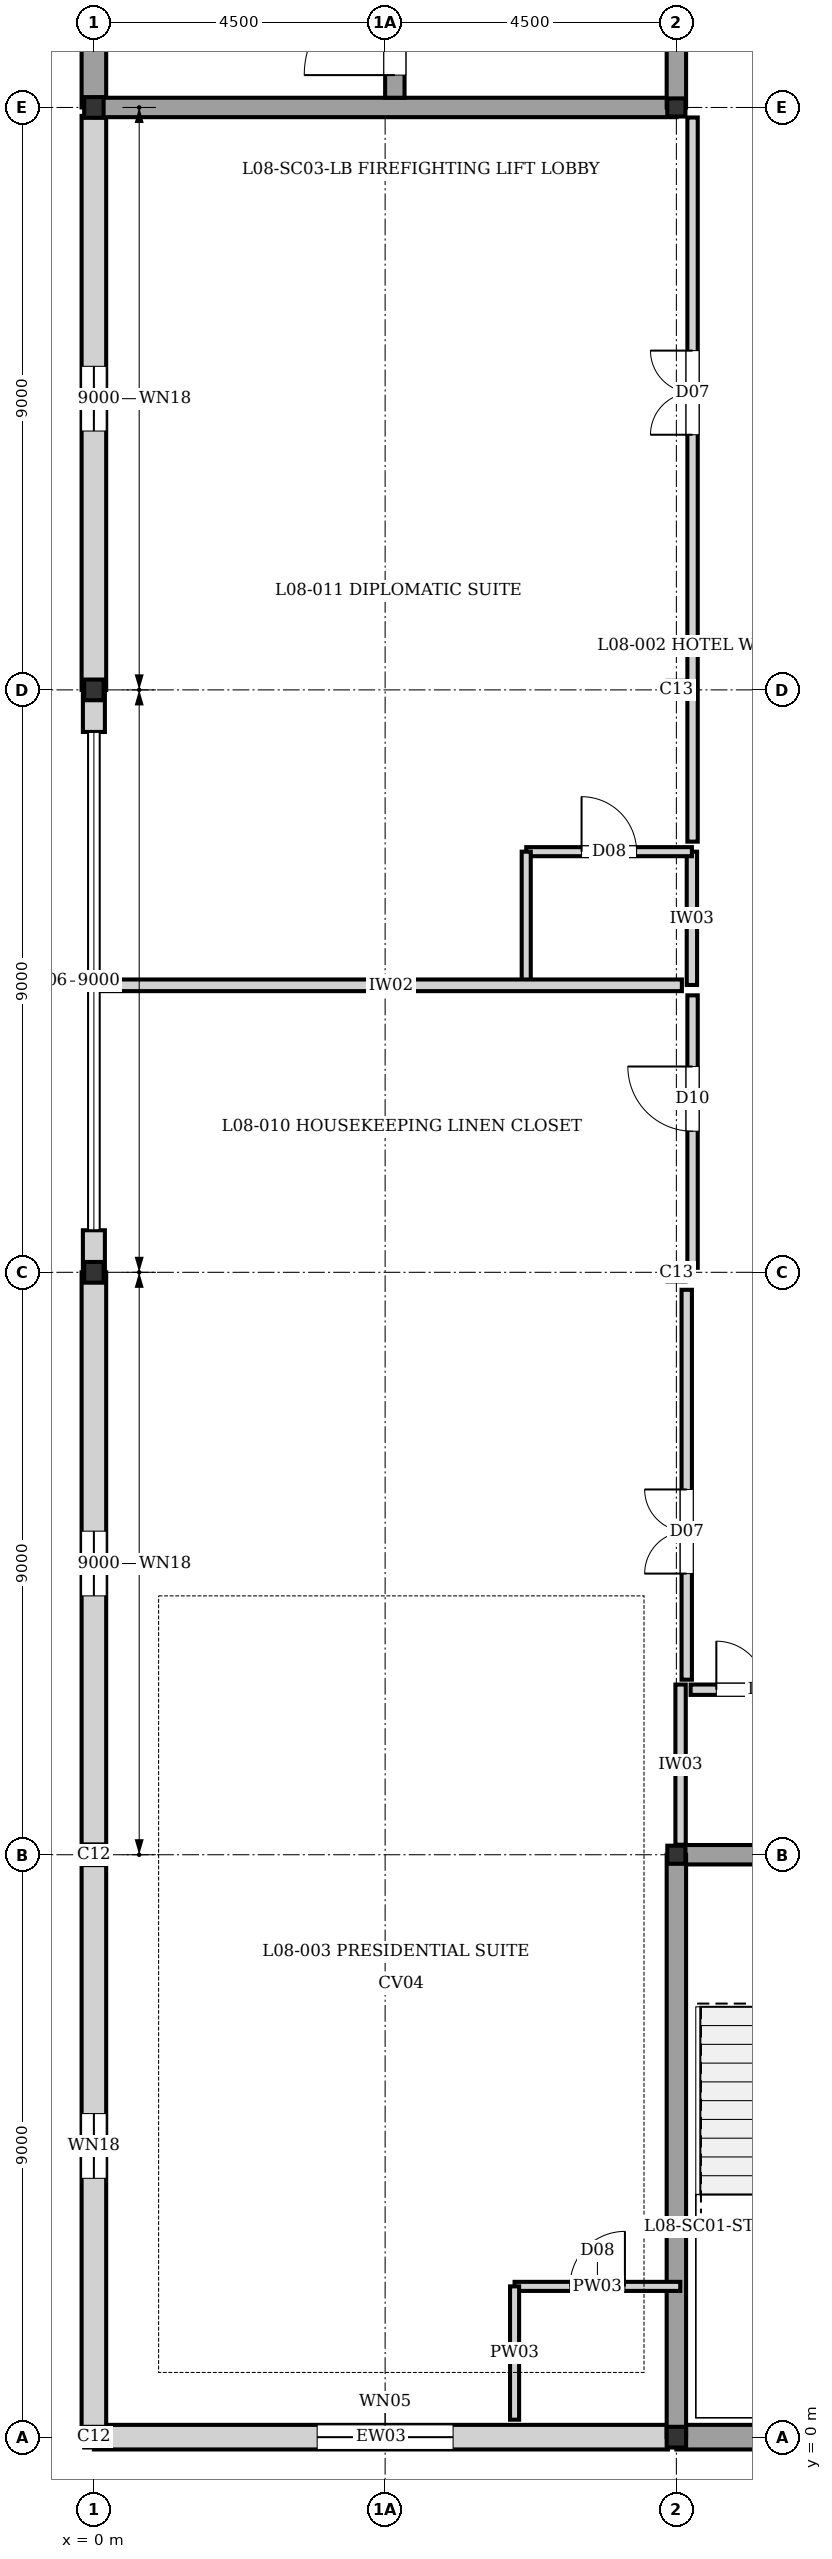
"""IFC4 building model, lengths in metres.
Left out: names, types, materials, properties, quantities, classifications, styles, units other than length and angle.
Written with IfcOpenShell. Run it as: python <this file> out.ifc"""

import sys

from ifc_helpers import new_model, si_unit, direction, frame, frame_2d, origin, origin_2d, place, context, subcontext, project, spatial, rectangle, i_section, extrude, element, fill, save


model = new_model("IFC4")
c1 = context("Model", 3, precision=1e-05, world=origin(), true_north=direction((0.0, 1.0)))
c2 = subcontext(c1, "Body", "Model", "MODEL_VIEW")
j1 = project(units=[si_unit("LENGTHUNIT", "METRE"), si_unit("PLANEANGLEUNIT", "RADIAN")], contexts=[c1])
p1 = place(None, origin())
s1 = spatial("IfcSite", under=j1, at=p1, CompositionType="ELEMENT")
p2 = place(p1, origin())
s2 = spatial("IfcBuilding", under=s1, at=p2, CompositionType="ELEMENT")
p3 = place(p2, frame((0.0, 0.0, 26.88)))
s3 = spatial("IfcBuildingStorey", under=s2, at=p3, CompositionType="ELEMENT", Elevation=26.88)
for number, where, z_axis, x_axis in (
    (1, (0.0, 0.0, 0.0), (0.0, 0.0, 1.0), (1.0, 0.0, 0.0)),
    (2, (0.0, 9.0, 0.0), (0.0, 0.0, 1.0), (1.0, 0.0, 0.0)),
    (3, (0.0, 18.0, 0.0), (0.0, 0.0, 1.0), (1.0, 0.0, 0.0)),
    (4, (0.0, 27.0, 0.0), (0.0, 0.0, 1.0), (1.0, 0.0, 0.0)),
    (5, (0.0, 36.0, 0.0), (0.0, 0.0, 1.0), (1.0, 0.0, 0.0)),
    (6, (9.0, 0.0, 0.0), (0.0, 0.0, 1.0), (1.0, 0.0, 0.0)),
):
    element("IfcColumn", number, at=place(p3, frame(where, z_axis=z_axis, x_axis=x_axis)), inside=s3, PredefinedType="COLUMN", context=c2, shape_type="SweptSolid", body=[
        extrude(i_section(OverallWidth=0.3, OverallDepth=0.32, WebThickness=0.011, FlangeThickness=0.021, at=origin_2d()), origin(), (0.0, 0.0, 1.0), 3.52),
    ])
for number, where, z_axis, x_axis in (
    (7, (9.0, 9.0, 0.0), (0.0, 0.0, 1.0), (1.0, 0.0, 0.0)),
    (8, (9.0, 18.0, 0.0), (0.0, 0.0, 1.0), (1.0, 0.0, 0.0)),
    (9, (9.0, 27.0, 0.0), (0.0, 0.0, 1.0), (1.0, 0.0, 0.0)),
    (10, (9.0, 36.0, 0.0), (0.0, 0.0, 1.0), (1.0, 0.0, 0.0)),
):
    element("IfcColumn", number, at=place(p3, frame(where, z_axis=z_axis, x_axis=x_axis)), inside=s3, PredefinedType="COLUMN", context=c2, shape_type="SweptSolid", body=[
        extrude(i_section(OverallWidth=0.28, OverallDepth=0.28, WebThickness=0.01, FlangeThickness=0.018, at=origin_2d()), origin(), (0.0, 0.0, 1.0), 3.52),
    ])
p4 = place(p3, frame((18.0, 0.0, 0.0), z_axis=(0.0, 0.0, 1.0), x_axis=(-1.0, 0.0, 0.0)))
e11 = element("IfcWall", 11, at=p4, inside=s3, PredefinedType="SOLIDWALL", context=c2, shape_type="SweptSolid", body=[
    extrude(rectangle(XDim=9.0, YDim=0.38, at=frame_2d((4.5, 0.0))), origin(), (0.0, 0.0, 1.0), 3.27),
])
p5 = place(p3, frame((8.87, 0.0, 0.0), z_axis=(0.0, 0.0, 1.0), x_axis=(-1.0, 0.0, 0.0)))
e12 = element("IfcWall", 12, at=p5, inside=s3, PredefinedType="SOLIDWALL", context=c2, shape_type="SweptSolid", body=[
    extrude(rectangle(XDim=8.87, YDim=0.38, at=frame_2d((4.435, 0.0))), origin(), (0.0, 0.0, 1.0), 3.27),
])
p6 = place(p5, frame((3.32, 0.0, 0.4)))
e13 = element("IfcOpeningElement", 13, at=p6, cuts=e12, PredefinedType="OPENING", context=c2, shape_type="SweptSolid", body=[
    extrude(rectangle(XDim=2.1, YDim=1.95, at=frame_2d((1.05, 0.975))), frame((0.0, 0.2, 0.0), z_axis=(0.0, -1.0, 0.0), x_axis=(1.0, 0.0, 0.0)), (0.0, 0.0, 1.0), 0.4),
])
p7 = place(p3, frame((0.0, 0.155, 0.0), z_axis=(0.0, 0.0, 1.0), x_axis=(0.0, 1.0, 0.0)))
e14 = element("IfcWall", 14, at=p7, inside=s3, PredefinedType="SOLIDWALL", context=c2, shape_type="SweptSolid", body=[
    extrude(rectangle(XDim=8.845, YDim=0.38, at=frame_2d((4.422, 0.0))), origin(), (0.0, 0.0, 1.0), 2.87),
])
p8 = place(p7, frame((3.845, 0.0, 0.4)))
e15 = element("IfcOpeningElement", 15, at=p8, cuts=e14, PredefinedType="OPENING", context=c2, shape_type="SweptSolid", body=[
    extrude(rectangle(XDim=1.0, YDim=1.6, at=frame_2d((0.5, 0.8))), frame((0.0, 0.2, 0.0), z_axis=(0.0, -1.0, 0.0), x_axis=(1.0, 0.0, 0.0)), (0.0, 0.0, 1.0), 0.4),
])
p9 = place(p3, frame((0.0, 9.0, 0.0), z_axis=(0.0, 0.0, 1.0), x_axis=(0.0, 1.0, 0.0)))
e16 = element("IfcWall", 16, at=p9, inside=s3, PredefinedType="SOLIDWALL", context=c2, shape_type="SweptSolid", body=[
    extrude(rectangle(XDim=9.0, YDim=0.38, at=frame_2d((4.5, 0.0))), origin(), (0.0, 0.0, 1.0), 3.27),
])
p10 = place(p9, frame((4.0, 0.0, 0.4)))
e17 = element("IfcOpeningElement", 17, at=p10, cuts=e16, PredefinedType="OPENING", context=c2, shape_type="SweptSolid", body=[
    extrude(rectangle(XDim=1.0, YDim=1.6, at=frame_2d((0.5, 0.8))), frame((0.0, 0.2, 0.0), z_axis=(0.0, -1.0, 0.0), x_axis=(1.0, 0.0, 0.0)), (0.0, 0.0, 1.0), 0.4),
])
for number, where, z_axis, x_axis in (
    (18, (0.0, 18.0, 0.0), (0.0, 0.0, 1.0), (0.0, 1.0, 0.0)),
    (19, (0.0, 26.35, 0.0), (0.0, 0.0, 1.0), (0.0, 1.0, 0.0)),
):
    element("IfcWall", number, at=place(p3, frame(where, z_axis=z_axis, x_axis=x_axis)), inside=s3, PredefinedType="SOLIDWALL", context=c2, shape_type="SweptSolid", body=[
        extrude(rectangle(XDim=0.65, YDim=0.34, at=frame_2d((0.325, 0.0))), origin(), (0.0, 0.0, 1.0), 2.97),
    ])
p11 = place(p3, frame((0.0, 27.0, 0.0), z_axis=(0.0, 0.0, 1.0), x_axis=(0.0, 1.0, 0.0)))
e20 = element("IfcWall", 20, at=p11, inside=s3, PredefinedType="SOLIDWALL", context=c2, shape_type="SweptSolid", body=[
    extrude(rectangle(XDim=8.87, YDim=0.38, at=frame_2d((4.435, 0.0))), origin(), (0.0, 0.0, 1.0), 3.27),
])
p12 = place(p11, frame((4.0, 0.0, 0.4)))
e21 = element("IfcOpeningElement", 21, at=p12, cuts=e20, PredefinedType="OPENING", context=c2, shape_type="SweptSolid", body=[
    extrude(rectangle(XDim=1.0, YDim=1.6, at=frame_2d((0.5, 0.8))), frame((0.0, 0.2, 0.0), z_axis=(0.0, -1.0, 0.0), x_axis=(1.0, 0.0, 0.0)), (0.0, 0.0, 1.0), 0.4),
])
p13 = place(p3, frame((0.0, 36.0, 0.0), z_axis=(0.0, 0.0, 1.0), x_axis=(0.0, 1.0, 0.0)))
e22 = element("IfcWall", 22, at=p13, inside=s3, PredefinedType="SOLIDWALL", context=c2, shape_type="SweptSolid", body=[
    extrude(rectangle(XDim=9.0, YDim=0.38, at=frame_2d((4.5, 0.0))), origin(), (0.0, 0.0, 1.0), 3.27),
])
p14 = place(p3, frame((9.0, 9.0, 0.0), z_axis=(0.0, 0.0, 1.0), x_axis=(1.0, 0.0, 0.0)))
e23 = element("IfcWall", 23, at=p14, inside=s3, PredefinedType="SHEAR", context=c2, shape_type="SweptSolid", body=[
    extrude(rectangle(XDim=9.0, YDim=0.3, at=frame_2d((4.5, 0.0))), origin(), (0.0, 0.0, 1.0), 3.27),
])
p15 = place(p14, frame((5.95, 0.0, 0.0)))
e24 = element("IfcOpeningElement", 24, at=p15, cuts=e23, PredefinedType="OPENING", context=c2, shape_type="SweptSolid", body=[
    extrude(rectangle(XDim=1.6, YDim=2.1, at=frame_2d((0.8, 1.05))), frame((0.0, 0.16, 0.0), z_axis=(0.0, -1.0, 0.0), x_axis=(1.0, 0.0, 0.0)), (0.0, 0.0, 1.0), 0.32),
])
for number, where, z_axis, x_axis in (
    (25, (9.0, 0.0, 0.0), (0.0, 0.0, 1.0), (0.0, 1.0, 0.0)),
    (26, (0.0, 36.0, 0.0), (0.0, 0.0, 1.0), (1.0, 0.0, 0.0)),
):
    element("IfcWall", number, at=place(p3, frame(where, z_axis=z_axis, x_axis=x_axis)), inside=s3, PredefinedType="SHEAR", context=c2, shape_type="SweptSolid", body=[
        extrude(rectangle(XDim=9.0, YDim=0.3, at=frame_2d((4.5, 0.0))), origin(), (0.0, 0.0, 1.0), 3.27),
    ])
p16 = place(p3, frame((9.0, 36.0, 0.0), z_axis=(0.0, 0.0, 1.0), x_axis=(0.0, 1.0, 0.0)))
e27 = element("IfcWall", 27, at=p16, inside=s3, PredefinedType="SHEAR", context=c2, shape_type="SweptSolid", body=[
    extrude(rectangle(XDim=9.0, YDim=0.3, at=frame_2d((4.5, 0.0))), origin(), (0.0, 0.0, 1.0), 3.27),
])
p17 = place(p16, frame((1.95, 0.0, 0.0)))
e28 = element("IfcOpeningElement", 28, at=p17, cuts=e27, PredefinedType="OPENING", context=c2, shape_type="SweptSolid", body=[
    extrude(rectangle(XDim=1.6, YDim=2.1, at=frame_2d((0.8, 1.05))), frame((0.0, 0.16, 0.0), z_axis=(0.0, -1.0, 0.0), x_axis=(1.0, 0.0, 0.0)), (0.0, 0.0, 1.0), 0.32),
])
p18 = place(p3, frame((4.65, 36.15, 0.0), z_axis=(0.0, 0.0, 1.0), x_axis=(0.0, 1.0, 0.0)))
e29 = element("IfcWall", 29, at=p18, inside=s3, PredefinedType="SHEAR", context=c2, shape_type="SweptSolid", body=[
    extrude(rectangle(XDim=8.7, YDim=0.3, at=frame_2d((4.35, 0.0))), origin(), (0.0, 0.0, 1.0), 3.27),
])
p19 = place(p18, frame((0.35, 0.0, 0.0)))
e30 = element("IfcOpeningElement", 30, at=p19, cuts=e29, PredefinedType="OPENING", context=c2, shape_type="SweptSolid", body=[
    extrude(rectangle(XDim=1.4, YDim=2.02, at=frame_2d((0.7, 1.01))), frame((0.0, 0.16, 0.0), z_axis=(0.0, -1.0, 0.0), x_axis=(1.0, 0.0, 0.0)), (0.0, 0.0, 1.0), 0.32),
])
p20 = place(p3, frame((6.5, 2.33, 0.0), z_axis=(0.0, 0.0, 1.0), x_axis=(1.0, 0.0, 0.0)))
e31 = element("IfcWall", 31, at=p20, inside=s3, PredefinedType="PLUMBINGWALL", context=c2, shape_type="SweptSolid", body=[
    extrude(rectangle(XDim=2.56, YDim=0.14, at=frame_2d((1.28, 0.0))), origin(), (0.0, 0.0, 1.0), 3.27),
])
p21 = place(p20, frame((0.855, 0.0, 0.0)))
e32 = element("IfcOpeningElement", 32, at=p21, cuts=e31, PredefinedType="OPENING", context=c2, shape_type="SweptSolid", body=[
    extrude(rectangle(XDim=0.85, YDim=2.04, at=frame_2d((0.425, 1.02))), frame((0.0, 0.08, 0.0), z_axis=(0.0, -1.0, 0.0), x_axis=(1.0, 0.0, 0.0)), (0.0, 0.0, 1.0), 0.16),
])
p22 = place(p3, frame((6.5, 0.27, 0.0), z_axis=(0.0, 0.0, 1.0), x_axis=(0.0, 1.0, 0.0)))
e33 = element("IfcWall", 33, at=p22, inside=s3, PredefinedType="PLUMBINGWALL", context=c2, shape_type="SweptSolid", body=[
    extrude(rectangle(XDim=2.06, YDim=0.14, at=frame_2d((1.03, 0.0))), origin(), (0.0, 0.0, 1.0), 3.27),
])
p23 = place(p3, frame((9.24, 22.44, 0.0), z_axis=(0.0, 0.0, 1.0), x_axis=(0.0, 1.0, 0.0)))
e34 = element("IfcWall", 34, at=p23, inside=s3, PredefinedType="PARTITIONING", context=c2, shape_type="SweptSolid", body=[
    extrude(rectangle(XDim=2.06, YDim=0.16, at=frame_2d((1.03, 0.0))), origin(), (0.0, 0.0, 1.0), 3.27),
])
p24 = place(p3, frame((6.68, 24.5, 0.0), z_axis=(0.0, 0.0, 1.0), x_axis=(1.0, 0.0, 0.0)))
e35 = element("IfcWall", 35, at=p24, inside=s3, PredefinedType="PLUMBINGWALL", context=c2, shape_type="SweptSolid", body=[
    extrude(rectangle(XDim=2.56, YDim=0.14, at=frame_2d((1.28, 0.0))), origin(), (0.0, 0.0, 1.0), 3.27),
])
p25 = place(p24, frame((0.855, 0.0, 0.0)))
e36 = element("IfcOpeningElement", 36, at=p25, cuts=e35, PredefinedType="OPENING", context=c2, shape_type="SweptSolid", body=[
    extrude(rectangle(XDim=0.85, YDim=2.04, at=frame_2d((0.425, 1.02))), frame((0.0, 0.08, 0.0), z_axis=(0.0, -1.0, 0.0), x_axis=(1.0, 0.0, 0.0)), (0.0, 0.0, 1.0), 0.16),
])
p26 = place(p3, frame((6.68, 22.44, 0.0), z_axis=(0.0, 0.0, 1.0), x_axis=(0.0, 1.0, 0.0)))
e37 = element("IfcWall", 37, at=p26, inside=s3, PredefinedType="PLUMBINGWALL", context=c2, shape_type="SweptSolid", body=[
    extrude(rectangle(XDim=2.06, YDim=0.14, at=frame_2d((1.03, 0.0))), origin(), (0.0, 0.0, 1.0), 3.27),
])
p27 = place(p3, frame((0.095, 22.435, 0.0), z_axis=(0.0, 0.0, 1.0), x_axis=(1.0, 0.0, 0.0)))
e38 = element("IfcWall", 38, at=p27, inside=s3, PredefinedType="PARTITIONING", context=c2, shape_type="SweptSolid", body=[
    extrude(rectangle(XDim=8.99, YDim=0.18, at=frame_2d((4.495, 0.0))), origin(), (0.0, 0.0, 1.0), 3.27),
])
p28 = place(p3, frame((9.065, 9.155, 0.0), z_axis=(0.0, 0.0, 1.0), x_axis=(0.0, 1.0, 0.0)))
e39 = element("IfcWall", 39, at=p28, inside=s3, PredefinedType="PARTITIONING", context=c2, shape_type="SweptSolid", body=[
    extrude(rectangle(XDim=2.475, YDim=0.16, at=frame_2d((1.237, 0.0))), origin(), (0.0, 0.0, 1.0), 3.27),
])
p29 = place(p3, frame((9.22, 11.55, 0.0), z_axis=(0.0, 0.0, 1.0), x_axis=(1.0, 0.0, 0.0)))
e40 = element("IfcWall", 40, at=p29, inside=s3, PredefinedType="PARTITIONING", context=c2, shape_type="SweptSolid", body=[
    extrude(rectangle(XDim=2.295, YDim=0.16, at=frame_2d((1.147, 0.0))), origin(), (0.0, 0.0, 1.0), 3.27),
])
p30 = place(p29, frame((0.397, 0.0, 0.0)))
e41 = element("IfcOpeningElement", 41, at=p30, cuts=e40, PredefinedType="OPENING", context=c2, shape_type="SweptSolid", body=[
    extrude(rectangle(XDim=1.5, YDim=2.1, at=frame_2d((0.75, 1.05))), frame((0.0, 0.09, 0.0), z_axis=(0.0, -1.0, 0.0), x_axis=(1.0, 0.0, 0.0)), (0.0, 0.0, 1.0), 0.18),
])
p31 = place(p3, frame((9.16, 11.705, 0.0), z_axis=(0.0, 0.0, 1.0), x_axis=(0.0, 1.0, 0.0)))
e42 = element("IfcWall", 42, at=p31, inside=s3, PredefinedType="PARTITIONING", context=c2, shape_type="SweptSolid", body=[
    extrude(rectangle(XDim=6.025, YDim=0.16, at=frame_2d((3.012, 0.0))), origin(), (0.0, 0.0, 1.0), 3.27),
])
p32 = place(p31, frame((1.639, 0.0, 0.0)))
e43 = element("IfcOpeningElement", 43, at=p32, cuts=e42, PredefinedType="OPENING", context=c2, shape_type="SweptSolid", body=[
    extrude(rectangle(XDim=1.3, YDim=2.25, at=frame_2d((0.65, 1.125))), frame((0.0, 0.09, 0.0), z_axis=(0.0, -1.0, 0.0), x_axis=(1.0, 0.0, 0.0)), (0.0, 0.0, 1.0), 0.18),
])
p33 = place(p3, frame((9.25, 18.07, 0.0), z_axis=(0.0, 0.0, 1.0), x_axis=(0.0, 1.0, 0.0)))
e44 = element("IfcWall", 44, at=p33, inside=s3, PredefinedType="PARTITIONING", context=c2, shape_type="SweptSolid", body=[
    extrude(rectangle(XDim=4.21, YDim=0.16, at=frame_2d((2.105, 0.0))), origin(), (0.0, 0.0, 1.0), 3.27),
])
p34 = place(p33, frame((2.11, 0.0, 0.0)))
e45 = element("IfcOpeningElement", 45, at=p34, cuts=e44, PredefinedType="OPENING", context=c2, shape_type="SweptSolid", body=[
    extrude(rectangle(XDim=1.0, YDim=2.1, at=frame_2d((0.5, 1.05))), frame((0.0, 0.09, 0.0), z_axis=(0.0, -1.0, 0.0), x_axis=(1.0, 0.0, 0.0)), (0.0, 0.0, 1.0), 0.18),
])
p35 = place(p3, frame((9.25, 24.655, 0.0), z_axis=(0.0, 0.0, 1.0), x_axis=(0.0, 1.0, 0.0)))
e46 = element("IfcWall", 46, at=p35, inside=s3, PredefinedType="PARTITIONING", context=c2, shape_type="SweptSolid", body=[
    extrude(rectangle(XDim=11.19, YDim=0.16, at=frame_2d((5.595, 0.0))), origin(), (0.0, 0.0, 1.0), 3.27),
])
p36 = place(p35, frame((6.288, 0.0, 0.0)))
e47 = element("IfcOpeningElement", 47, at=p36, cuts=e46, PredefinedType="OPENING", context=c2, shape_type="SweptSolid", body=[
    extrude(rectangle(XDim=1.3, YDim=2.25, at=frame_2d((0.65, 1.125))), frame((0.0, 0.09, 0.0), z_axis=(0.0, -1.0, 0.0), x_axis=(1.0, 0.0, 0.0)), (0.0, 0.0, 1.0), 0.18),
])
p37 = place(p6, origin())
e48 = element("IfcWindow", 48, at=p37, inside=s3, PartitioningType="SINGLE_PANEL", PredefinedType="WINDOW", context=c2, shape_type="SweptSolid", body=[
    extrude(rectangle(XDim=2.1, YDim=1.95, at=frame_2d((1.05, 0.975))), frame((0.0, 0.03, 0.0), z_axis=(0.0, -1.0, 0.0), x_axis=(1.0, 0.0, 0.0)), (0.0, 0.0, 1.0), 0.06),
])
fill(e13, e48)
p38 = place(p8, origin())
e49 = element("IfcWindow", 49, at=p38, inside=s3, PartitioningType="SINGLE_PANEL", PredefinedType="WINDOW", context=c2, shape_type="SweptSolid", body=[
    extrude(rectangle(XDim=1.0, YDim=1.6, at=frame_2d((0.5, 0.8))), frame((0.0, 0.03, 0.0), z_axis=(0.0, -1.0, 0.0), x_axis=(1.0, 0.0, 0.0)), (0.0, 0.0, 1.0), 0.06),
])
fill(e15, e49)
p39 = place(p10, origin())
e50 = element("IfcWindow", 50, at=p39, inside=s3, PartitioningType="SINGLE_PANEL", PredefinedType="WINDOW", context=c2, shape_type="SweptSolid", body=[
    extrude(rectangle(XDim=1.0, YDim=1.6, at=frame_2d((0.5, 0.8))), frame((0.0, 0.03, 0.0), z_axis=(0.0, -1.0, 0.0), x_axis=(1.0, 0.0, 0.0)), (0.0, 0.0, 1.0), 0.06),
])
fill(e17, e50)
p40 = place(p12, origin())
e51 = element("IfcWindow", 51, at=p40, inside=s3, PartitioningType="SINGLE_PANEL", PredefinedType="WINDOW", context=c2, shape_type="SweptSolid", body=[
    extrude(rectangle(XDim=1.0, YDim=1.6, at=frame_2d((0.5, 0.8))), frame((0.0, 0.03, 0.0), z_axis=(0.0, -1.0, 0.0), x_axis=(1.0, 0.0, 0.0)), (0.0, 0.0, 1.0), 0.06),
])
fill(e21, e51)
p41 = place(p19, origin())
e52 = element("IfcDoor", 52, at=p41, inside=s3, OperationType="SINGLE_SWING_LEFT", PredefinedType="DOOR", context=c2, shape_type="SweptSolid", body=[
    extrude(rectangle(XDim=1.4, YDim=2.02, at=frame_2d((0.7, 1.01))), frame((0.0, 0.025, 0.0), z_axis=(0.0, -1.0, 0.0), x_axis=(1.0, 0.0, 0.0)), (0.0, 0.0, 1.0), 0.05),
])
fill(e30, e52)
p42 = place(p21, origin())
e53 = element("IfcDoor", 53, at=p42, inside=s3, OperationType="SINGLE_SWING_RIGHT", PredefinedType="DOOR", context=c2, shape_type="SweptSolid", body=[
    extrude(rectangle(XDim=0.85, YDim=2.04, at=frame_2d((0.425, 1.02))), frame((0.0, 0.025, 0.0), z_axis=(0.0, -1.0, 0.0), x_axis=(1.0, 0.0, 0.0)), (0.0, 0.0, 1.0), 0.05),
])
fill(e32, e53)
p43 = place(p25, origin())
e54 = element("IfcDoor", 54, at=p43, inside=s3, OperationType="SINGLE_SWING_LEFT", PredefinedType="DOOR", context=c2, shape_type="SweptSolid", body=[
    extrude(rectangle(XDim=0.85, YDim=2.04, at=frame_2d((0.425, 1.02))), frame((0.0, 0.025, 0.0), z_axis=(0.0, -1.0, 0.0), x_axis=(1.0, 0.0, 0.0)), (0.0, 0.0, 1.0), 0.05),
])
fill(e36, e54)
p44 = place(p30, origin())
e55 = element("IfcDoor", 55, at=p44, inside=s3, OperationType="DOUBLE_DOOR_SINGLE_SWING", PredefinedType="DOOR", context=c2, shape_type="SweptSolid", body=[
    extrude(rectangle(XDim=1.5, YDim=2.1, at=frame_2d((0.75, 1.05))), frame((0.0, 0.025, 0.0), z_axis=(0.0, -1.0, 0.0), x_axis=(1.0, 0.0, 0.0)), (0.0, 0.0, 1.0), 0.05),
])
fill(e41, e55)
p45 = place(p32, origin())
e56 = element("IfcDoor", 56, at=p45, inside=s3, OperationType="DOUBLE_DOOR_SINGLE_SWING", PredefinedType="DOOR", context=c2, shape_type="SweptSolid", body=[
    extrude(rectangle(XDim=1.3, YDim=2.25, at=frame_2d((0.65, 1.125))), frame((0.0, 0.025, 0.0), z_axis=(0.0, -1.0, 0.0), x_axis=(1.0, 0.0, 0.0)), (0.0, 0.0, 1.0), 0.05),
])
fill(e43, e56)
p46 = place(p34, origin())
e57 = element("IfcDoor", 57, at=p46, inside=s3, OperationType="SINGLE_SWING_RIGHT", PredefinedType="DOOR", context=c2, shape_type="SweptSolid", body=[
    extrude(rectangle(XDim=1.0, YDim=2.1, at=frame_2d((0.5, 1.05))), frame((0.0, 0.025, 0.0), z_axis=(0.0, -1.0, 0.0), x_axis=(1.0, 0.0, 0.0)), (0.0, 0.0, 1.0), 0.05),
])
fill(e45, e57)
p47 = place(p36, origin())
e58 = element("IfcDoor", 58, at=p47, inside=s3, OperationType="DOUBLE_DOOR_SINGLE_SWING", PredefinedType="DOOR", context=c2, shape_type="SweptSolid", body=[
    extrude(rectangle(XDim=1.3, YDim=2.25, at=frame_2d((0.65, 1.125))), frame((0.0, 0.025, 0.0), z_axis=(0.0, -1.0, 0.0), x_axis=(1.0, 0.0, 0.0)), (0.0, 0.0, 1.0), 0.05),
])
fill(e47, e58)
save(model, sys.argv[1])
